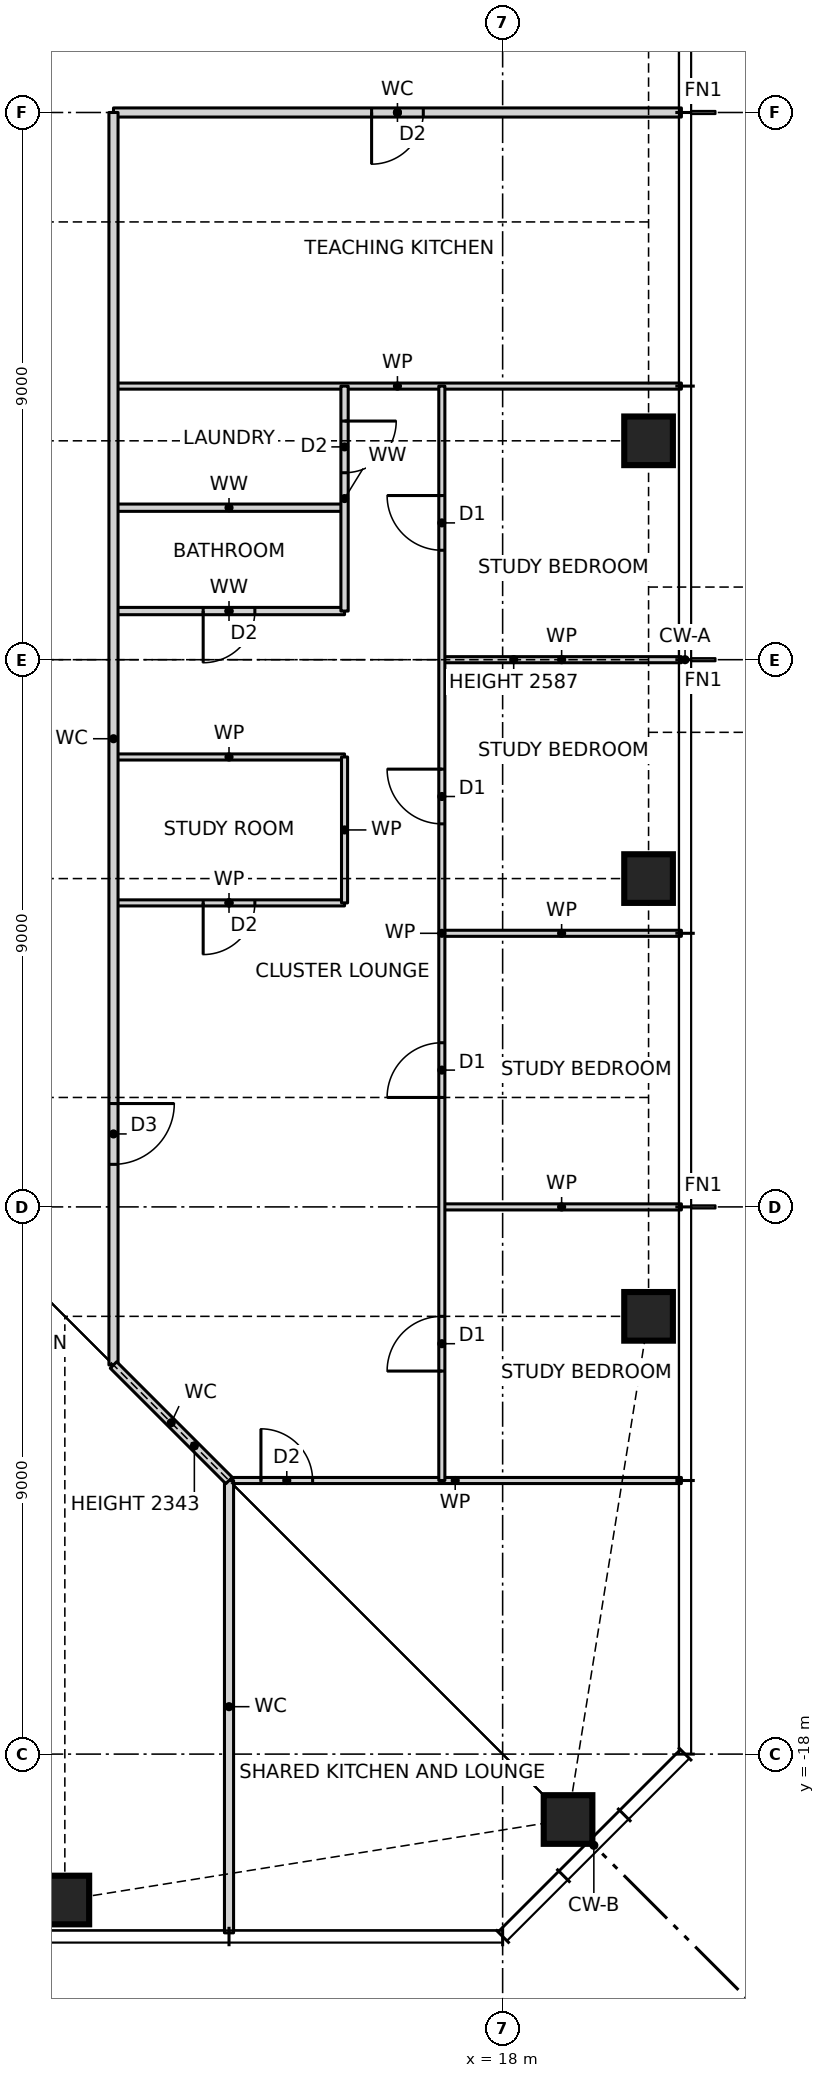
"""IFC4 building model, lengths in metres.
Left out: names, types, materials, properties, quantities, classifications, styles, units other than length and angle.
Written with IfcOpenShell. Run it as: python <this file> out.ifc"""

import sys

from ifc_helpers import new_model, si_unit, direction, frame, frame_2d, origin, origin_2d, place, context, subcontext, project, spatial, rectangle, hollow_rectangle, extrude, element, fill, save


model = new_model("IFC4")
c1 = context("Model", 3, precision=1e-05, world=origin(), true_north=direction((0.0, 1.0)))
c2 = subcontext(c1, "Body", "Model", "MODEL_VIEW")
j1 = project(units=[si_unit("LENGTHUNIT", "METRE"), si_unit("PLANEANGLEUNIT", "RADIAN")], contexts=[c1])
p1 = place(None, origin())
s1 = spatial("IfcSite", under=j1, at=p1, CompositionType="ELEMENT")
p2 = place(p1, origin())
s2 = spatial("IfcBuilding", under=s1, at=p2, CompositionType="ELEMENT")
p3 = place(p2, frame((0.0, 0.0, 126.0)))
s3 = spatial("IfcBuildingStorey", under=s2, at=p3, CompositionType="ELEMENT", Elevation=126.0)
for number, where, z_axis, x_axis in (
    (1, (10.8, -20.4, 0.0), (0.0, 0.0, 1.0), (1.0, 0.0, 0.0)),
    (2, (19.076, -19.076, 0.0), (0.0, 0.0, 1.0), (1.0, 0.0, 0.0)),
    (3, (20.4, -10.8, 0.0), (0.0, 0.0, 1.0), (1.0, 0.0, 0.0)),
    (4, (20.4, -3.6, 0.0), (0.0, 0.0, 1.0), (1.0, 0.0, 0.0)),
    (5, (20.4, 3.6, 0.0), (0.0, 0.0, 1.0), (1.0, 0.0, 0.0)),
):
    element("IfcColumn", number, at=place(p3, frame(where, z_axis=z_axis, x_axis=x_axis)), inside=s3, PredefinedType="COLUMN", context=c2, shape_type="SweptSolid", body=[
        extrude(hollow_rectangle(XDim=0.8, YDim=0.8, WallThickness=0.07, at=origin_2d()), origin(), (0.0, 0.0, 1.0), 3.5),
    ])
p4 = place(p3, frame((13.5, -13.5, 0.0), z_axis=(0.0, 0.0, 1.0), x_axis=(1.0, 0.0, 0.0)))
e6 = element("IfcWall", 6, at=p4, inside=s3, PredefinedType="PARTITIONING", context=c2, shape_type="SweptSolid", body=[
    extrude(rectangle(XDim=7.44, YDim=0.1, at=frame_2d((3.72, 0.0))), origin(), (0.0, 0.0, 1.0), 3.27),
])
p5 = place(p4, frame((0.525, 0.0, 0.0)))
e7 = element("IfcOpeningElement", 7, at=p5, cuts=e6, PredefinedType="OPENING", context=c2, shape_type="SweptSolid", body=[
    extrude(rectangle(XDim=0.85, YDim=2.1, at=frame_2d((0.425, 1.05))), frame((0.0, 0.06, 0.0), z_axis=(0.0, -1.0, 0.0), x_axis=(1.0, 0.0, 0.0)), (0.0, 0.0, 1.0), 0.12),
])
for number, where, z_axis, x_axis in (
    (8, (17.0, -9.0, 0.0), (0.0, 0.0, 1.0), (1.0, 0.0, 0.0)),
    (9, (17.0, -4.5, 0.0), (0.0, 0.0, 1.0), (1.0, 0.0, 0.0)),
):
    element("IfcWall", number, at=place(p3, frame(where, z_axis=z_axis, x_axis=x_axis)), inside=s3, PredefinedType="PARTITIONING", context=c2, shape_type="SweptSolid", body=[
        extrude(rectangle(XDim=3.94, YDim=0.1, at=frame_2d((1.97, 0.0))), origin(), (0.0, 0.0, 1.0), 3.27),
    ])
p6 = place(p3, frame((11.6, -4.0, 0.0), z_axis=(0.0, 0.0, 1.0), x_axis=(1.0, 0.0, 0.0)))
e10 = element("IfcWall", 10, at=p6, inside=s3, PredefinedType="PARTITIONING", context=c2, shape_type="SweptSolid", body=[
    extrude(rectangle(XDim=3.8, YDim=0.1, at=frame_2d((1.9, 0.0))), origin(), (0.0, 0.0, 1.0), 3.27),
])
p7 = place(p6, frame((1.475, 0.0, 0.0)))
e11 = element("IfcOpeningElement", 11, at=p7, cuts=e10, PredefinedType="OPENING", context=c2, shape_type="SweptSolid", body=[
    extrude(rectangle(XDim=0.85, YDim=2.1, at=frame_2d((0.425, 1.05))), frame((0.0, 0.06, 0.0), z_axis=(0.0, -1.0, 0.0), x_axis=(1.0, 0.0, 0.0)), (0.0, 0.0, 1.0), 0.12),
])
p8 = place(p3, frame((11.6, -1.6, 0.0), z_axis=(0.0, 0.0, 1.0), x_axis=(1.0, 0.0, 0.0)))
e12 = element("IfcWall", 12, at=p8, inside=s3, PredefinedType="PARTITIONING", context=c2, shape_type="SweptSolid", body=[
    extrude(rectangle(XDim=3.8, YDim=0.1, at=frame_2d((1.9, 0.0))), origin(), (0.0, 0.0, 1.0), 3.27),
])
p9 = place(p3, frame((17.0, 0.0, 0.0), z_axis=(0.0, 0.0, 1.0), x_axis=(1.0, 0.0, 0.0)))
e13 = element("IfcWall", 13, at=p9, inside=s3, PredefinedType="PARTITIONING", context=c2, shape_type="SweptSolid", body=[
    extrude(rectangle(XDim=3.94, YDim=0.1, at=frame_2d((1.97, 0.0))), origin(), (0.0, 0.0, 1.0), 2.587),
])
p10 = place(p3, frame((11.6, 0.8, 0.0), z_axis=(0.0, 0.0, 1.0), x_axis=(1.0, 0.0, 0.0)))
e14 = element("IfcWall", 14, at=p10, inside=s3, PredefinedType="PARTITIONING", context=c2, shape_type="SweptSolid", body=[
    extrude(rectangle(XDim=3.8, YDim=0.12, at=frame_2d((1.9, 0.0))), origin(), (0.0, 0.0, 1.0), 3.27),
])
p11 = place(p10, frame((1.475, 0.0, 0.0)))
e15 = element("IfcOpeningElement", 15, at=p11, cuts=e14, PredefinedType="OPENING", context=c2, shape_type="SweptSolid", body=[
    extrude(rectangle(XDim=0.85, YDim=2.1, at=frame_2d((0.425, 1.05))), frame((0.0, 0.07, 0.0), z_axis=(0.0, -1.0, 0.0), x_axis=(1.0, 0.0, 0.0)), (0.0, 0.0, 1.0), 0.14),
])
p12 = place(p3, frame((11.6, 2.5, 0.0), z_axis=(0.0, 0.0, 1.0), x_axis=(1.0, 0.0, 0.0)))
e16 = element("IfcWall", 16, at=p12, inside=s3, PredefinedType="PARTITIONING", context=c2, shape_type="SweptSolid", body=[
    extrude(rectangle(XDim=3.8, YDim=0.12, at=frame_2d((1.9, 0.0))), origin(), (0.0, 0.0, 1.0), 3.27),
])
p13 = place(p3, frame((11.6, 4.5, 0.0), z_axis=(0.0, 0.0, 1.0), x_axis=(1.0, 0.0, 0.0)))
e17 = element("IfcWall", 17, at=p13, inside=s3, PredefinedType="PARTITIONING", context=c2, shape_type="SweptSolid", body=[
    extrude(rectangle(XDim=9.34, YDim=0.1, at=frame_2d((4.67, 0.0))), origin(), (0.0, 0.0, 1.0), 3.27),
])
p14 = place(p3, frame((11.6, 9.0, 0.0), z_axis=(0.0, 0.0, 1.0), x_axis=(1.0, 0.0, 0.0)))
e18 = element("IfcWall", 18, at=p14, inside=s3, PredefinedType="PARTITIONING", context=c2, shape_type="SweptSolid", body=[
    extrude(rectangle(XDim=9.34, YDim=0.15, at=frame_2d((4.67, 0.0))), origin(), (0.0, 0.0, 1.0), 3.27),
])
p15 = place(p14, frame((4.245, 0.0, 0.0)))
e19 = element("IfcOpeningElement", 19, at=p15, cuts=e18, PredefinedType="OPENING", context=c2, shape_type="SweptSolid", body=[
    extrude(rectangle(XDim=0.85, YDim=2.1, at=frame_2d((0.425, 1.05))), frame((0.0, 0.085, 0.0), z_axis=(0.0, -1.0, 0.0), x_axis=(1.0, 0.0, 0.0)), (0.0, 0.0, 1.0), 0.17),
])
p16 = place(p3, frame((17.0, -13.5, 0.0), z_axis=(0.0, 0.0, 1.0), x_axis=(0.0, 1.0, 0.0)))
e20 = element("IfcWall", 20, at=p16, inside=s3, PredefinedType="PARTITIONING", context=c2, shape_type="SweptSolid", body=[
    extrude(rectangle(XDim=18.0, YDim=0.1, at=frame_2d((9.0, 0.0))), origin(), (0.0, 0.0, 1.0), 3.27),
])
p17 = place(p16, frame((1.8, 0.0, 0.0)))
e21 = element("IfcOpeningElement", 21, at=p17, cuts=e20, PredefinedType="OPENING", context=c2, shape_type="SweptSolid", body=[
    extrude(rectangle(XDim=0.9, YDim=2.1, at=frame_2d((0.45, 1.05))), frame((0.0, 0.06, 0.0), z_axis=(0.0, -1.0, 0.0), x_axis=(1.0, 0.0, 0.0)), (0.0, 0.0, 1.0), 0.12),
])
p18 = place(p16, frame((6.3, 0.0, 0.0)))
e22 = element("IfcOpeningElement", 22, at=p18, cuts=e20, PredefinedType="OPENING", context=c2, shape_type="SweptSolid", body=[
    extrude(rectangle(XDim=0.9, YDim=2.1, at=frame_2d((0.45, 1.05))), frame((0.0, 0.06, 0.0), z_axis=(0.0, -1.0, 0.0), x_axis=(1.0, 0.0, 0.0)), (0.0, 0.0, 1.0), 0.12),
])
p19 = place(p16, frame((10.8, 0.0, 0.0)))
e23 = element("IfcOpeningElement", 23, at=p19, cuts=e20, PredefinedType="OPENING", context=c2, shape_type="SweptSolid", body=[
    extrude(rectangle(XDim=0.9, YDim=2.1, at=frame_2d((0.45, 1.05))), frame((0.0, 0.06, 0.0), z_axis=(0.0, -1.0, 0.0), x_axis=(1.0, 0.0, 0.0)), (0.0, 0.0, 1.0), 0.12),
])
p20 = place(p16, frame((15.3, 0.0, 0.0)))
e24 = element("IfcOpeningElement", 24, at=p20, cuts=e20, PredefinedType="OPENING", context=c2, shape_type="SweptSolid", body=[
    extrude(rectangle(XDim=0.9, YDim=2.1, at=frame_2d((0.45, 1.05))), frame((0.0, 0.06, 0.0), z_axis=(0.0, -1.0, 0.0), x_axis=(1.0, 0.0, 0.0)), (0.0, 0.0, 1.0), 0.12),
])
p21 = place(p3, frame((15.4, -4.0, 0.0), z_axis=(0.0, 0.0, 1.0), x_axis=(0.0, 1.0, 0.0)))
e25 = element("IfcWall", 25, at=p21, inside=s3, PredefinedType="PARTITIONING", context=c2, shape_type="SweptSolid", body=[
    extrude(rectangle(XDim=2.4, YDim=0.1, at=frame_2d((1.2, 0.0))), origin(), (0.0, 0.0, 1.0), 3.27),
])
p22 = place(p3, frame((15.4, 0.8, 0.0), z_axis=(0.0, 0.0, 1.0), x_axis=(0.0, 1.0, 0.0)))
e26 = element("IfcWall", 26, at=p22, inside=s3, PredefinedType="PARTITIONING", context=c2, shape_type="SweptSolid", body=[
    extrude(rectangle(XDim=3.7, YDim=0.12, at=frame_2d((1.85, 0.0))), origin(), (0.0, 0.0, 1.0), 3.27),
])
p23 = place(p22, frame((2.275, 0.0, 0.0)))
e27 = element("IfcOpeningElement", 27, at=p23, cuts=e26, PredefinedType="OPENING", context=c2, shape_type="SweptSolid", body=[
    extrude(rectangle(XDim=0.85, YDim=2.1, at=frame_2d((0.425, 1.05))), frame((0.0, 0.07, 0.0), z_axis=(0.0, -1.0, 0.0), x_axis=(1.0, 0.0, 0.0)), (0.0, 0.0, 1.0), 0.14),
])
p24 = place(p3, frame((13.5, -20.94, 0.0), z_axis=(0.0, 0.0, 1.0), x_axis=(0.0, 1.0, 0.0)))
e28 = element("IfcWall", 28, at=p24, inside=s3, PredefinedType="PARTITIONING", context=c2, shape_type="SweptSolid", body=[
    extrude(rectangle(XDim=7.44, YDim=0.15, at=frame_2d((3.72, 0.0))), origin(), (0.0, 0.0, 1.0), 3.27),
])
p25 = place(p3, frame((11.6, -11.6, 0.0), z_axis=(0.0, 0.0, 1.0), x_axis=(0.0, 1.0, 0.0)))
e29 = element("IfcWall", 29, at=p25, inside=s3, PredefinedType="PARTITIONING", context=c2, shape_type="SweptSolid", body=[
    extrude(rectangle(XDim=20.6, YDim=0.15, at=frame_2d((10.3, 0.0))), origin(), (0.0, 0.0, 1.0), 3.27),
])
p26 = place(p25, frame((3.3, 0.0, 0.0)))
e30 = element("IfcOpeningElement", 30, at=p26, cuts=e29, PredefinedType="OPENING", context=c2, shape_type="SweptSolid", body=[
    extrude(rectangle(XDim=1.0, YDim=2.1, at=frame_2d((0.5, 1.05))), frame((0.0, 0.085, 0.0), z_axis=(0.0, -1.0, 0.0), x_axis=(1.0, 0.0, 0.0)), (0.0, 0.0, 1.0), 0.17),
])
p27 = place(p3, frame((13.5, -13.5, 0.0), z_axis=(0.0, 0.0, 1.0), x_axis=(-0.707106781187, 0.707106781187, 0.0)))
e31 = element("IfcWall", 31, at=p27, inside=s3, PredefinedType="PARTITIONING", context=c2, shape_type="SweptSolid", body=[
    extrude(rectangle(XDim=2.687, YDim=0.15, at=frame_2d((1.343, 0.0))), origin(), (0.0, 0.0, 1.0), 2.343),
])
p28 = place(p17, origin())
e32 = element("IfcDoor", 32, at=p28, inside=s3, OperationType="SINGLE_SWING_LEFT", PredefinedType="DOOR", context=c2, shape_type="SweptSolid", body=[
    extrude(rectangle(XDim=0.9, YDim=2.1, at=frame_2d((0.45, 1.05))), frame((0.0, 0.025, 0.0), z_axis=(0.0, -1.0, 0.0), x_axis=(1.0, 0.0, 0.0)), (0.0, 0.0, 1.0), 0.05),
])
fill(e21, e32)
p29 = place(p18, origin())
e33 = element("IfcDoor", 33, at=p29, inside=s3, OperationType="SINGLE_SWING_LEFT", PredefinedType="DOOR", context=c2, shape_type="SweptSolid", body=[
    extrude(rectangle(XDim=0.9, YDim=2.1, at=frame_2d((0.45, 1.05))), frame((0.0, 0.025, 0.0), z_axis=(0.0, -1.0, 0.0), x_axis=(1.0, 0.0, 0.0)), (0.0, 0.0, 1.0), 0.05),
])
fill(e22, e33)
p30 = place(p19, origin())
e34 = element("IfcDoor", 34, at=p30, inside=s3, OperationType="SINGLE_SWING_RIGHT", PredefinedType="DOOR", context=c2, shape_type="SweptSolid", body=[
    extrude(rectangle(XDim=0.9, YDim=2.1, at=frame_2d((0.45, 1.05))), frame((0.0, 0.025, 0.0), z_axis=(0.0, -1.0, 0.0), x_axis=(1.0, 0.0, 0.0)), (0.0, 0.0, 1.0), 0.05),
])
fill(e23, e34)
p31 = place(p20, origin())
e35 = element("IfcDoor", 35, at=p31, inside=s3, OperationType="SINGLE_SWING_RIGHT", PredefinedType="DOOR", context=c2, shape_type="SweptSolid", body=[
    extrude(rectangle(XDim=0.9, YDim=2.1, at=frame_2d((0.45, 1.05))), frame((0.0, 0.025, 0.0), z_axis=(0.0, -1.0, 0.0), x_axis=(1.0, 0.0, 0.0)), (0.0, 0.0, 1.0), 0.05),
])
fill(e24, e35)
p32 = place(p26, frame((1.0, 0.0, 0.0), z_axis=(0.0, 0.0, 1.0), x_axis=(-1.0, 0.0, 0.0)))
e36 = element("IfcDoor", 36, at=p32, inside=s3, OperationType="SINGLE_SWING_LEFT", PredefinedType="DOOR", context=c2, shape_type="SweptSolid", body=[
    extrude(rectangle(XDim=1.0, YDim=2.1, at=frame_2d((0.5, 1.05))), frame((0.0, 0.025, 0.0), z_axis=(0.0, -1.0, 0.0), x_axis=(1.0, 0.0, 0.0)), (0.0, 0.0, 1.0), 0.05),
])
fill(e30, e36)
p33 = place(p7, frame((0.85, 0.0, 0.0), z_axis=(0.0, 0.0, 1.0), x_axis=(-1.0, 0.0, 0.0)))
e37 = element("IfcDoor", 37, at=p33, inside=s3, OperationType="SINGLE_SWING_RIGHT", PredefinedType="DOOR", context=c2, shape_type="SweptSolid", body=[
    extrude(rectangle(XDim=0.85, YDim=2.1, at=frame_2d((0.425, 1.05))), frame((0.0, 0.025, 0.0), z_axis=(0.0, -1.0, 0.0), x_axis=(1.0, 0.0, 0.0)), (0.0, 0.0, 1.0), 0.05),
])
fill(e11, e37)
p34 = place(p11, frame((0.85, 0.0, 0.0), z_axis=(0.0, 0.0, 1.0), x_axis=(-1.0, 0.0, 0.0)))
e38 = element("IfcDoor", 38, at=p34, inside=s3, OperationType="SINGLE_SWING_RIGHT", PredefinedType="DOOR", context=c2, shape_type="SweptSolid", body=[
    extrude(rectangle(XDim=0.85, YDim=2.1, at=frame_2d((0.425, 1.05))), frame((0.0, 0.025, 0.0), z_axis=(0.0, -1.0, 0.0), x_axis=(1.0, 0.0, 0.0)), (0.0, 0.0, 1.0), 0.05),
])
fill(e15, e38)
p35 = place(p23, frame((0.85, 0.0, 0.0), z_axis=(0.0, 0.0, 1.0), x_axis=(-1.0, 0.0, 0.0)))
e39 = element("IfcDoor", 39, at=p35, inside=s3, OperationType="SINGLE_SWING_LEFT", PredefinedType="DOOR", context=c2, shape_type="SweptSolid", body=[
    extrude(rectangle(XDim=0.85, YDim=2.1, at=frame_2d((0.425, 1.05))), frame((0.0, 0.025, 0.0), z_axis=(0.0, -1.0, 0.0), x_axis=(1.0, 0.0, 0.0)), (0.0, 0.0, 1.0), 0.05),
])
fill(e27, e39)
p36 = place(p15, frame((0.85, 0.0, 0.0), z_axis=(0.0, 0.0, 1.0), x_axis=(-1.0, 0.0, 0.0)))
e40 = element("IfcDoor", 40, at=p36, inside=s3, OperationType="SINGLE_SWING_RIGHT", PredefinedType="DOOR", context=c2, shape_type="SweptSolid", body=[
    extrude(rectangle(XDim=0.85, YDim=2.1, at=frame_2d((0.425, 1.05))), frame((0.0, 0.025, 0.0), z_axis=(0.0, -1.0, 0.0), x_axis=(1.0, 0.0, 0.0)), (0.0, 0.0, 1.0), 0.05),
])
fill(e19, e40)
p37 = place(p5, origin())
e41 = element("IfcDoor", 41, at=p37, inside=s3, OperationType="SINGLE_SWING_LEFT", PredefinedType="DOOR", context=c2, shape_type="SweptSolid", body=[
    extrude(rectangle(XDim=0.85, YDim=2.1, at=frame_2d((0.425, 1.05))), frame((0.0, 0.025, 0.0), z_axis=(0.0, -1.0, 0.0), x_axis=(1.0, 0.0, 0.0)), (0.0, 0.0, 1.0), 0.05),
])
fill(e7, e41)
save(model, sys.argv[1])
